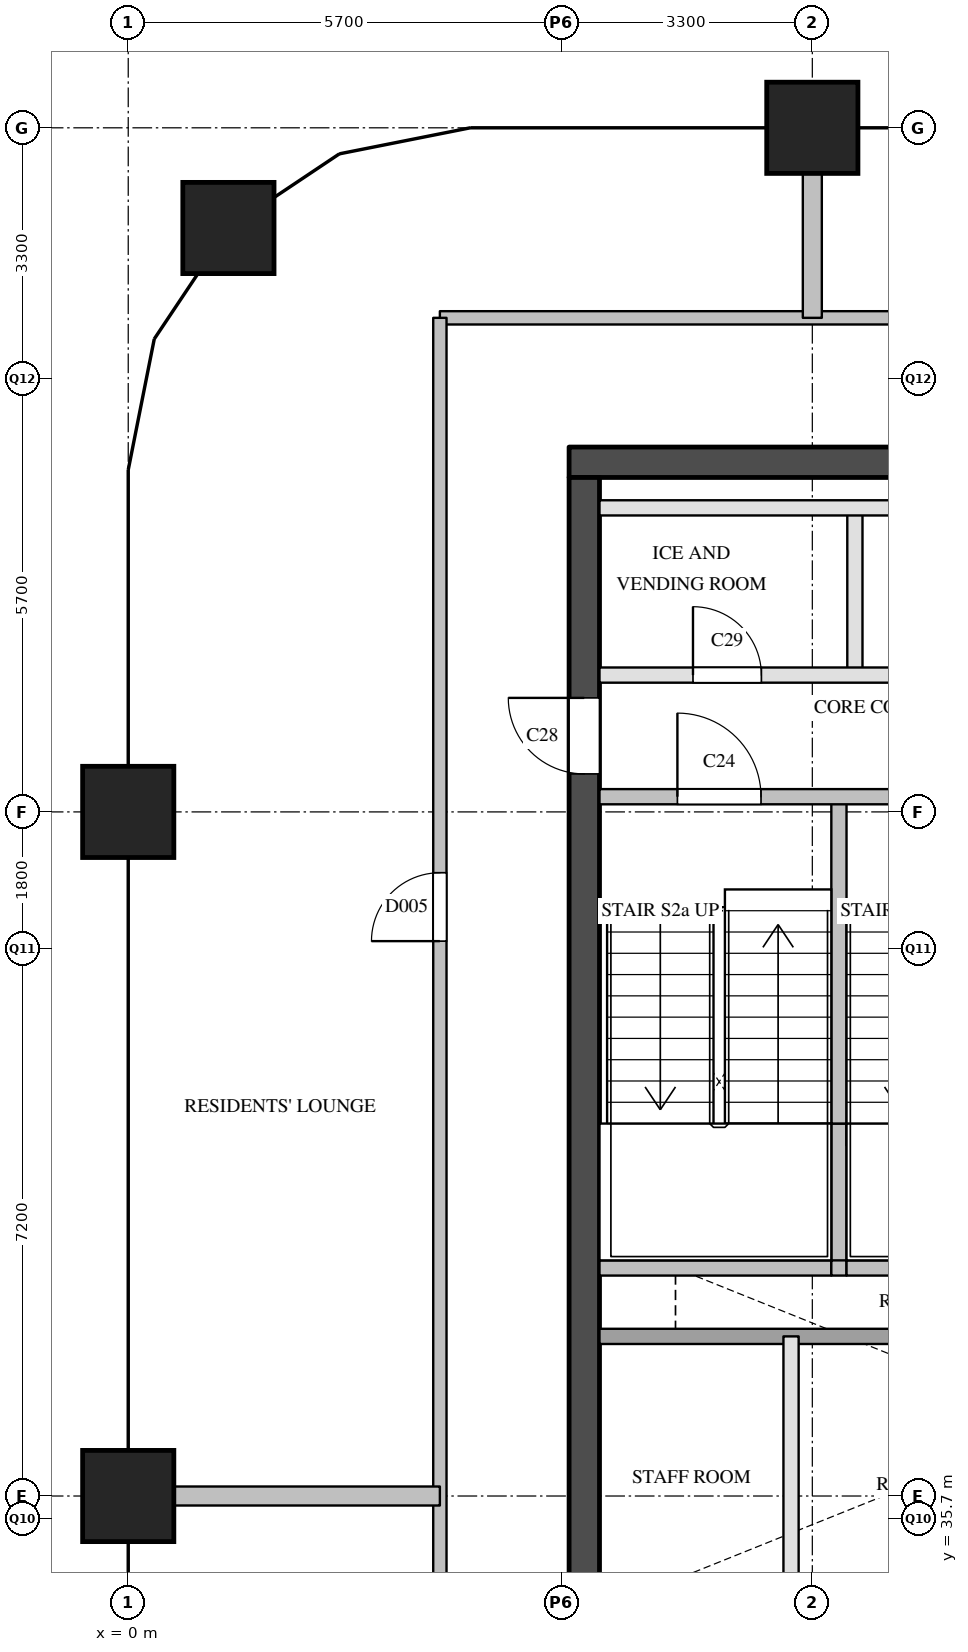
"""IFC4 building model, lengths in metres.
Left out: names, types, materials, properties, quantities, classifications, styles, units other than length and angle.
Written with IfcOpenShell. Run it as: python <this file> out.ifc"""

import sys

from ifc_helpers import new_model, si_unit, direction, frame, frame_2d, origin, origin_2d, place, context, subcontext, project, spatial, rectangle, extrude, element, fill, save


model = new_model("IFC4")
c1 = context("Model", 3, precision=1e-05, world=origin(), true_north=direction((0.0, 1.0)))
c2 = subcontext(c1, "Body", "Model", "MODEL_VIEW")
j1 = project(units=[si_unit("LENGTHUNIT", "METRE"), si_unit("PLANEANGLEUNIT", "RADIAN")], contexts=[c1])
p1 = place(None, origin())
s1 = spatial("IfcSite", under=j1, at=p1, CompositionType="ELEMENT")
p2 = place(p1, origin())
s2 = spatial("IfcBuilding", under=s1, at=p2, CompositionType="ELEMENT")
p3 = place(p2, frame((0.0, 0.0, 218.9)))
s3 = spatial("IfcBuildingStorey", under=s2, at=p3, CompositionType="ELEMENT", Elevation=218.9)
for number, where, z_axis, x_axis in (
    (1, (0.0, 36.0, 0.0), (0.0, 0.0, 1.0), (1.0, 0.0, 0.0)),
    (2, (0.0, 45.0, 0.0), (0.0, 0.0, 1.0), (1.0, 0.0, 0.0)),
    (3, (1.318, 52.682, 0.0), (0.0, 0.0, 1.0), (1.0, 0.0, 0.0)),
    (4, (9.0, 54.0, 0.0), (0.0, 0.0, 1.0), (1.0, 0.0, 0.0)),
):
    element("IfcColumn", number, at=place(p3, frame(where, z_axis=z_axis, x_axis=x_axis)), inside=s3, PredefinedType="COLUMN", context=c2, shape_type="SweptSolid", body=[
        extrude(rectangle(XDim=1.2, YDim=1.2, at=origin_2d()), origin(), (0.0, 0.0, 1.0), 3.9),
    ])
p4 = place(p3, frame((5.8, 49.6, 0.0), z_axis=(0.0, 0.0, 1.0), x_axis=(1.0, 0.0, 0.0)))
e5 = element("IfcWall", 5, at=p4, inside=s3, PredefinedType="SHEAR", context=c2, shape_type="SweptSolid", body=[
    extrude(rectangle(XDim=12.0, YDim=0.4, at=frame_2d((6.0, 0.0))), origin(), (0.0, 0.0, 1.0), 3.6),
])
p5 = place(p3, frame((6.0, 29.1, 0.0), z_axis=(0.0, 0.0, 1.0), x_axis=(0.0, 1.0, 0.0)))
e6 = element("IfcWall", 6, at=p5, inside=s3, PredefinedType="SHEAR", context=c2, shape_type="SweptSolid", body=[
    extrude(rectangle(XDim=20.3, YDim=0.4, at=frame_2d((10.15, 0.0))), origin(), (0.0, 0.0, 1.0), 3.6),
])
p6 = place(p5, frame((3.45, 0.0, 0.0)))
e7 = element("IfcOpeningElement", 7, at=p6, cuts=e6, PredefinedType="OPENING", context=c2, shape_type="SweptSolid", body=[
    extrude(rectangle(XDim=1.0, YDim=2.1, at=frame_2d((0.5, 1.05))), frame((0.0, 0.21, 0.0), z_axis=(0.0, -1.0, 0.0), x_axis=(1.0, 0.0, 0.0)), (0.0, 0.0, 1.0), 0.42),
])
p7 = place(p5, frame((16.4, 0.0, 0.0)))
e8 = element("IfcOpeningElement", 8, at=p7, cuts=e6, PredefinedType="OPENING", context=c2, shape_type="SweptSolid", body=[
    extrude(rectangle(XDim=1.0, YDim=2.1, at=frame_2d((0.5, 1.05))), frame((0.0, 0.21, 0.0), z_axis=(0.0, -1.0, 0.0), x_axis=(1.0, 0.0, 0.0)), (0.0, 0.0, 1.0), 0.42),
])
p8 = place(p3, frame((8.72, 33.8, 0.0), z_axis=(0.0, 0.0, 1.0), x_axis=(0.0, 1.0, 0.0)))
e9 = element("IfcWall", 9, at=p8, inside=s3, PredefinedType="PARTITIONING", context=c2, shape_type="SweptSolid", body=[
    extrude(rectangle(XDim=4.3, YDim=0.2, at=frame_2d((2.15, 0.0))), origin(), (0.0, 0.0, 1.0), 3.6),
])
p9 = place(p3, frame((9.35, 39.0, 0.0), z_axis=(0.0, 0.0, 1.0), x_axis=(0.0, 1.0, 0.0)))
e10 = element("IfcWall", 10, at=p9, inside=s3, PredefinedType="SOLIDWALL", context=c2, shape_type="SweptSolid", body=[
    extrude(rectangle(XDim=1.9, YDim=0.2, at=frame_2d((0.95, 0.0))), origin(), (0.0, 0.0, 1.0), 3.6),
])
p10 = place(p3, frame((9.35, 40.9, 0.0), z_axis=(0.0, 0.0, 1.0), x_axis=(0.0, 1.0, 0.0)))
e11 = element("IfcWall", 11, at=p10, inside=s3, PredefinedType="SOLIDWALL", context=c2, shape_type="SweptSolid", body=[
    extrude(rectangle(XDim=4.3, YDim=0.2, at=frame_2d((2.15, 0.0))), origin(), (0.0, 0.0, 1.0), 3.6),
])
p11 = place(p3, frame((9.56, 46.8, 0.0), z_axis=(0.0, 0.0, 1.0), x_axis=(0.0, 1.0, 0.0)))
e12 = element("IfcWall", 12, at=p11, inside=s3, PredefinedType="PARTITIONING", context=c2, shape_type="SweptSolid", body=[
    extrude(rectangle(XDim=2.2, YDim=0.2, at=frame_2d((1.1, 0.0))), origin(), (0.0, 0.0, 1.0), 3.6),
])
p12 = place(p3, frame((6.2, 38.1, 0.0), z_axis=(0.0, 0.0, 1.0), x_axis=(1.0, 0.0, 0.0)))
e13 = element("IfcWall", 13, at=p12, inside=s3, PredefinedType="SOLIDWALL", context=c2, shape_type="SweptSolid", body=[
    extrude(rectangle(XDim=11.2, YDim=0.2, at=frame_2d((5.6, 0.0))), origin(), (0.0, 0.0, 1.0), 3.6),
])
p13 = place(p12, frame((8.85, 0.0, 0.0)))
e14 = element("IfcOpeningElement", 14, at=p13, cuts=e13, PredefinedType="OPENING", context=c2, shape_type="SweptSolid", body=[
    extrude(rectangle(XDim=1.2, YDim=2.1, at=frame_2d((0.6, 1.05))), frame((0.0, 0.11, 0.0), z_axis=(0.0, -1.0, 0.0), x_axis=(1.0, 0.0, 0.0)), (0.0, 0.0, 1.0), 0.22),
])
p14 = place(p3, frame((6.2, 39.0, 0.0), z_axis=(0.0, 0.0, 1.0), x_axis=(1.0, 0.0, 0.0)))
e15 = element("IfcWall", 15, at=p14, inside=s3, PredefinedType="SOLIDWALL", context=c2, shape_type="SweptSolid", body=[
    extrude(rectangle(XDim=3.05, YDim=0.2, at=frame_2d((1.525, 0.0))), origin(), (0.0, 0.0, 1.0), 3.6),
])
p15 = place(p3, frame((9.25, 39.0, 0.0), z_axis=(0.0, 0.0, 1.0), x_axis=(1.0, 0.0, 0.0)))
e16 = element("IfcWall", 16, at=p15, inside=s3, PredefinedType="SOLIDWALL", context=c2, shape_type="SweptSolid", body=[
    extrude(rectangle(XDim=0.2, YDim=0.2, at=frame_2d((0.1, 0.0))), origin(), (0.0, 0.0, 1.0), 3.6),
])
p16 = place(p3, frame((9.45, 39.0, 0.0), z_axis=(0.0, 0.0, 1.0), x_axis=(1.0, 0.0, 0.0)))
e17 = element("IfcWall", 17, at=p16, inside=s3, PredefinedType="SOLIDWALL", context=c2, shape_type="SweptSolid", body=[
    extrude(rectangle(XDim=3.05, YDim=0.2, at=frame_2d((1.525, 0.0))), origin(), (0.0, 0.0, 1.0), 3.6),
])
p17 = place(p3, frame((6.2, 45.2, 0.0), z_axis=(0.0, 0.0, 1.0), x_axis=(1.0, 0.0, 0.0)))
e18 = element("IfcWall", 18, at=p17, inside=s3, PredefinedType="SOLIDWALL", context=c2, shape_type="SweptSolid", body=[
    extrude(rectangle(XDim=6.3, YDim=0.2, at=frame_2d((3.15, 0.0))), origin(), (0.0, 0.0, 1.0), 3.6),
])
p18 = place(p17, frame((1.025, 0.0, 0.0)))
e19 = element("IfcOpeningElement", 19, at=p18, cuts=e18, PredefinedType="OPENING", context=c2, shape_type="SweptSolid", body=[
    extrude(rectangle(XDim=1.1, YDim=2.1, at=frame_2d((0.55, 1.05))), frame((0.0, 0.11, 0.0), z_axis=(0.0, -1.0, 0.0), x_axis=(1.0, 0.0, 0.0)), (0.0, 0.0, 1.0), 0.22),
])
p19 = place(p17, frame((4.175, 0.0, 0.0)))
e20 = element("IfcOpeningElement", 20, at=p19, cuts=e18, PredefinedType="OPENING", context=c2, shape_type="SweptSolid", body=[
    extrude(rectangle(XDim=1.1, YDim=2.1, at=frame_2d((0.55, 1.05))), frame((0.0, 0.11, 0.0), z_axis=(0.0, -1.0, 0.0), x_axis=(1.0, 0.0, 0.0)), (0.0, 0.0, 1.0), 0.22),
])
p20 = place(p3, frame((6.2, 46.8, 0.0), z_axis=(0.0, 0.0, 1.0), x_axis=(1.0, 0.0, 0.0)))
e21 = element("IfcWall", 21, at=p20, inside=s3, PredefinedType="PARTITIONING", context=c2, shape_type="SweptSolid", body=[
    extrude(rectangle(XDim=11.2, YDim=0.2, at=frame_2d((5.6, 0.0))), origin(), (0.0, 0.0, 1.0), 3.6),
])
p21 = place(p20, frame((1.23, 0.0, 0.0)))
e22 = element("IfcOpeningElement", 22, at=p21, cuts=e21, PredefinedType="OPENING", context=c2, shape_type="SweptSolid", body=[
    extrude(rectangle(XDim=0.9, YDim=2.1, at=frame_2d((0.45, 1.05))), frame((0.0, 0.11, 0.0), z_axis=(0.0, -1.0, 0.0), x_axis=(1.0, 0.0, 0.0)), (0.0, 0.0, 1.0), 0.22),
])
p22 = place(p20, frame((6.83, 0.0, 0.0)))
e23 = element("IfcOpeningElement", 23, at=p22, cuts=e21, PredefinedType="OPENING", context=c2, shape_type="SweptSolid", body=[
    extrude(rectangle(XDim=0.9, YDim=2.1, at=frame_2d((0.45, 1.05))), frame((0.0, 0.11, 0.0), z_axis=(0.0, -1.0, 0.0), x_axis=(1.0, 0.0, 0.0)), (0.0, 0.0, 1.0), 0.22),
])
p23 = place(p3, frame((6.2, 49.0, 0.0), z_axis=(0.0, 0.0, 1.0), x_axis=(1.0, 0.0, 0.0)))
e24 = element("IfcWall", 24, at=p23, inside=s3, PredefinedType="PARTITIONING", context=c2, shape_type="SweptSolid", body=[
    extrude(rectangle(XDim=11.2, YDim=0.2, at=frame_2d((5.6, 0.0))), origin(), (0.0, 0.0, 1.0), 3.6),
])
p24 = place(p3, frame((4.1, 51.5, 0.0), z_axis=(0.0, 0.0, 1.0), x_axis=(1.0, 0.0, 0.0)))
e25 = element("IfcWall", 25, at=p24, inside=s3, PredefinedType="PARTITIONING", context=c2, shape_type="SweptSolid", body=[
    extrude(rectangle(XDim=15.4, YDim=0.175, at=frame_2d((7.7, 0.0))), origin(), (0.0, 0.0, 1.0), 3.6),
])
p25 = place(p24, frame((8.455, 0.0, 0.0)))
e26 = element("IfcOpeningElement", 26, at=p25, cuts=e25, PredefinedType="OPENING", context=c2, shape_type="SweptSolid", body=[
    extrude(rectangle(XDim=1.0, YDim=2.1, at=frame_2d((0.5, 1.05))), frame((0.0, 0.097, 0.0), z_axis=(0.0, -1.0, 0.0), x_axis=(1.0, 0.0, 0.0)), (0.0, 0.0, 1.0), 0.195),
])
p26 = place(p3, frame((4.1, 28.5, 0.0), z_axis=(0.0, 0.0, 1.0), x_axis=(0.0, 1.0, 0.0)))
e27 = element("IfcWall", 27, at=p26, inside=s3, PredefinedType="PARTITIONING", context=c2, shape_type="SweptSolid", body=[
    extrude(rectangle(XDim=23.0, YDim=0.175, at=frame_2d((11.5, 0.0))), origin(), (0.0, 0.0, 1.0), 3.6),
])
p27 = place(p26, frame((3.3, 0.0, 0.0)))
e28 = element("IfcOpeningElement", 28, at=p27, cuts=e27, PredefinedType="OPENING", context=c2, shape_type="SweptSolid", body=[
    extrude(rectangle(XDim=0.9, YDim=2.1, at=frame_2d((0.45, 1.05))), frame((0.0, 0.097, 0.0), z_axis=(0.0, -1.0, 0.0), x_axis=(1.0, 0.0, 0.0)), (0.0, 0.0, 1.0), 0.195),
])
p28 = place(p26, frame((14.8, 0.0, 0.0)))
e29 = element("IfcOpeningElement", 29, at=p28, cuts=e27, PredefinedType="OPENING", context=c2, shape_type="SweptSolid", body=[
    extrude(rectangle(XDim=0.9, YDim=2.1, at=frame_2d((0.45, 1.05))), frame((0.0, 0.097, 0.0), z_axis=(0.0, -1.0, 0.0), x_axis=(1.0, 0.0, 0.0)), (0.0, 0.0, 1.0), 0.195),
])
p29 = place(p3, frame((0.0, 36.0, 0.0), z_axis=(0.0, 0.0, 1.0), x_axis=(1.0, 0.0, 0.0)))
e30 = element("IfcWall", 30, at=p29, inside=s3, PredefinedType="PARTITIONING", context=c2, shape_type="SweptSolid", body=[
    extrude(rectangle(XDim=4.1, YDim=0.25, at=frame_2d((2.05, 0.0))), origin(), (0.0, 0.0, 1.0), 3.6),
])
p30 = place(p3, frame((9.0, 51.5, 0.0), z_axis=(0.0, 0.0, 1.0), x_axis=(0.0, 1.0, 0.0)))
e31 = element("IfcWall", 31, at=p30, inside=s3, PredefinedType="PARTITIONING", context=c2, shape_type="SweptSolid", body=[
    extrude(rectangle(XDim=2.5, YDim=0.25, at=frame_2d((1.25, 0.0))), origin(), (0.0, 0.0, 1.0), 3.6),
])
p31 = place(p18, origin())
e32 = element("IfcDoor", 32, at=p31, inside=s3, OperationType="SINGLE_SWING_LEFT", PredefinedType="DOOR", context=c2, shape_type="SweptSolid", body=[
    extrude(rectangle(XDim=1.1, YDim=2.1, at=frame_2d((0.55, 1.05))), frame((0.0, 0.025, 0.0), z_axis=(0.0, -1.0, 0.0), x_axis=(1.0, 0.0, 0.0)), (0.0, 0.0, 1.0), 0.05),
])
fill(e19, e32)
p32 = place(p7, origin())
e33 = element("IfcDoor", 33, at=p32, inside=s3, OperationType="SINGLE_SWING_RIGHT", PredefinedType="DOOR", context=c2, shape_type="SweptSolid", body=[
    extrude(rectangle(XDim=1.0, YDim=2.1, at=frame_2d((0.5, 1.05))), frame((0.0, 0.025, 0.0), z_axis=(0.0, -1.0, 0.0), x_axis=(1.0, 0.0, 0.0)), (0.0, 0.0, 1.0), 0.05),
])
fill(e8, e33)
p33 = place(p21, origin())
e34 = element("IfcDoor", 34, at=p33, inside=s3, OperationType="SINGLE_SWING_LEFT", PredefinedType="DOOR", context=c2, shape_type="SweptSolid", body=[
    extrude(rectangle(XDim=0.9, YDim=2.1, at=frame_2d((0.45, 1.05))), frame((0.0, 0.025, 0.0), z_axis=(0.0, -1.0, 0.0), x_axis=(1.0, 0.0, 0.0)), (0.0, 0.0, 1.0), 0.05),
])
fill(e22, e34)
p34 = place(p28, origin())
e35 = element("IfcDoor", 35, at=p34, inside=s3, OperationType="SINGLE_SWING_LEFT", PredefinedType="DOOR", context=c2, shape_type="SweptSolid", body=[
    extrude(rectangle(XDim=0.9, YDim=2.1, at=frame_2d((0.45, 1.05))), frame((0.0, 0.025, 0.0), z_axis=(0.0, -1.0, 0.0), x_axis=(1.0, 0.0, 0.0)), (0.0, 0.0, 1.0), 0.05),
])
fill(e29, e35)
save(model, sys.argv[1])
